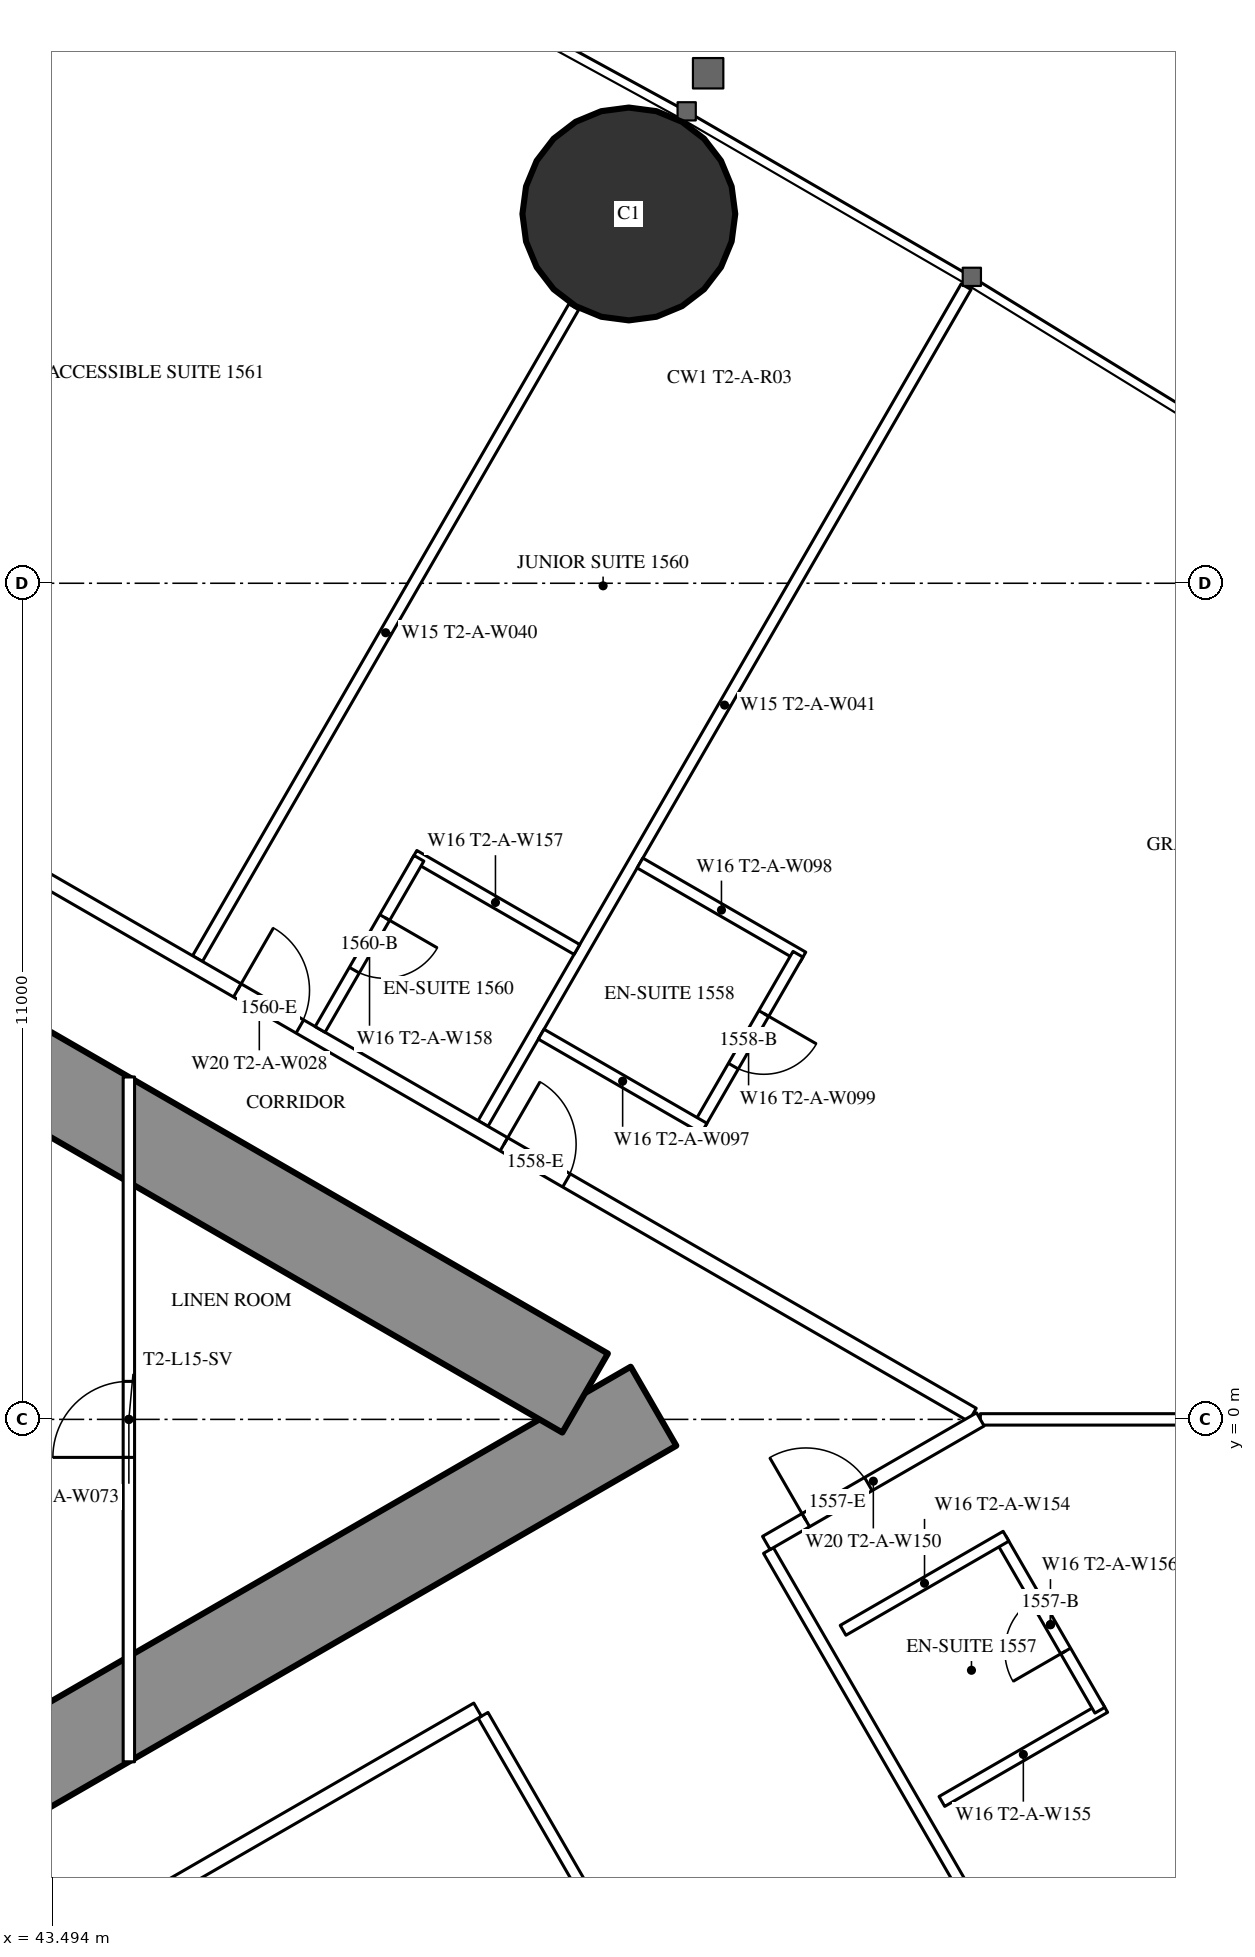
"""IFC4 building model, lengths in metres.
Left out: names, types, materials, properties, quantities, classifications, styles, units other than length and angle.
Written with IfcOpenShell. Run it as: python <this file> out.ifc"""

import sys

from ifc_helpers import new_model, si_unit, direction, frame, frame_2d, origin, origin_2d, place, context, subcontext, project, spatial, rectangle, hollow_circle, extrude, element, fill, save


model = new_model("IFC4")
c1 = context("Model", 3, precision=1e-05, world=origin(), true_north=direction((0.0, 1.0)))
c2 = subcontext(c1, "Body", "Model", "MODEL_VIEW")
j1 = project(units=[si_unit("LENGTHUNIT", "METRE"), si_unit("PLANEANGLEUNIT", "RADIAN")], contexts=[c1])
p1 = place(None, origin())
s1 = spatial("IfcSite", under=j1, at=p1, CompositionType="ELEMENT")
p2 = place(p1, origin())
s2 = spatial("IfcBuilding", under=s1, at=p2, CompositionType="ELEMENT")
p3 = place(p2, frame((0.0, 0.0, 60.0)))
s3 = spatial("IfcBuildingStorey", under=s2, at=p3, CompositionType="ELEMENT", Elevation=60.0)
p4 = place(p3, frame((51.078, 15.858, 0.0), z_axis=(0.0, 0.0, 1.0), x_axis=(1.0, 0.0, 0.0)))
e1 = element("IfcColumn", 1, at=p4, inside=s3, PredefinedType="COLUMN", context=c2, shape_type="SweptSolid", body=[
    extrude(hollow_circle(Radius=1.4, WallThickness=0.12, at=origin_2d()), origin(), (0.0, 0.0, 1.0), 3.5),
])
p5 = place(p3, frame((27.2, -13.8, 0.0), z_axis=(0.0, 0.0, 1.0), x_axis=(0.866027159892, 0.499996958321, 0.0)))
e2 = element("IfcWall", 2, at=p5, inside=s3, PredefinedType="SHEAR", context=c2, shape_type="SweptSolid", body=[
    extrude(rectangle(XDim=27.947, YDim=1.2, at=frame_2d((13.973, 0.0))), origin(), (0.0, 0.0, 1.0), 3.5),
])
p6 = place(p5, frame((4.6, 0.0, 0.0)))
e3 = element("IfcOpeningElement", 3, at=p6, cuts=e2, PredefinedType="OPENING", context=c2, shape_type="SweptSolid", body=[
    extrude(rectangle(XDim=1.0, YDim=2.2, at=frame_2d((0.5, 1.1))), frame((0.0, 0.61, 0.0), z_axis=(0.0, -1.0, 0.0), x_axis=(1.0, 0.0, 0.0)), (0.0, 0.0, 1.0), 1.22),
])
p7 = place(p5, frame((13.395, 0.0, 0.0)))
e4 = element("IfcOpeningElement", 4, at=p7, cuts=e2, PredefinedType="OPENING", context=c2, shape_type="SweptSolid", body=[
    extrude(rectangle(XDim=1.8, YDim=2.2, at=frame_2d((0.9, 1.1))), frame((0.0, 0.61, 0.0), z_axis=(0.0, -1.0, 0.0), x_axis=(1.0, 0.0, 0.0)), (0.0, 0.0, 1.0), 1.22),
])
p8 = place(p3, frame((27.2, 13.8, 0.0), z_axis=(0.0, 0.0, 1.0), x_axis=(0.866024515034, -0.500001539357, 0.0)))
e5 = element("IfcWall", 5, at=p8, inside=s3, PredefinedType="SHEAR", context=c2, shape_type="SweptSolid", body=[
    extrude(rectangle(XDim=26.907, YDim=1.2, at=frame_2d((13.454, 0.0))), origin(), (0.0, 0.0, 1.0), 3.5),
])
p9 = place(p8, frame((4.6, 0.0, 0.0)))
e6 = element("IfcOpeningElement", 6, at=p9, cuts=e5, PredefinedType="OPENING", context=c2, shape_type="SweptSolid", body=[
    extrude(rectangle(XDim=1.0, YDim=2.2, at=frame_2d((0.5, 1.1))), frame((0.0, 0.61, 0.0), z_axis=(0.0, -1.0, 0.0), x_axis=(1.0, 0.0, 0.0)), (0.0, 0.0, 1.0), 1.22),
])
p10 = place(p8, frame((13.395, 0.0, 0.0)))
e7 = element("IfcOpeningElement", 7, at=p10, cuts=e5, PredefinedType="OPENING", context=c2, shape_type="SweptSolid", body=[
    extrude(rectangle(XDim=1.8, YDim=2.2, at=frame_2d((0.9, 1.1))), frame((0.0, 0.61, 0.0), z_axis=(0.0, -1.0, 0.0), x_axis=(1.0, 0.0, 0.0)), (0.0, 0.0, 1.0), 1.22),
])
p11 = place(p3, frame((49.159, -3.893, 0.0), z_axis=(0.0, 0.0, 1.0), x_axis=(0.499998773722, -0.866026111775, 0.0)))
e8 = element("IfcWall", 8, at=p11, inside=s3, PredefinedType="PARTITIONING", context=c2, shape_type="SweptSolid", body=[
    extrude(rectangle(XDim=9.892, YDim=0.15, at=frame_2d((4.946, 0.0))), origin(), (0.0, 0.0, 1.0), 2.25),
])
p12 = place(p3, frame((52.915, -1.725, 0.0), z_axis=(0.0, 0.0, 1.0), x_axis=(0.499997163113, -0.866027041656, 0.0)))
e9 = element("IfcWall", 9, at=p12, inside=s3, PredefinedType="PARTITIONING", context=c2, shape_type="SweptSolid", body=[
    extrude(rectangle(XDim=12.591, YDim=0.15, at=frame_2d((6.295, 0.0))), origin(), (0.0, 0.0, 1.0), 3.25),
])
p13 = place(p3, frame((45.403, 6.062, 0.0), z_axis=(0.0, 0.0, 1.0), x_axis=(0.500013434677, 0.866017647131, 0.0)))
e10 = element("IfcWall", 10, at=p13, inside=s3, PredefinedType="PARTITIONING", context=c2, shape_type="SweptSolid", body=[
    extrude(rectangle(XDim=9.902, YDim=0.15, at=frame_2d((4.951, 0.0))), origin(), (0.0, 0.0, 1.0), 2.25),
])
p14 = place(p3, frame((49.159, 3.893, 0.0), z_axis=(0.0, 0.0, 1.0), x_axis=(0.499995664361, 0.866027906952, 0.0)))
e11 = element("IfcWall", 11, at=p14, inside=s3, PredefinedType="PARTITIONING", context=c2, shape_type="SweptSolid", body=[
    extrude(rectangle(XDim=12.711, YDim=0.15, at=frame_2d((6.356, 0.0))), origin(), (0.0, 0.0, 1.0), 3.25),
])
p15 = place(p3, frame((55.702, 0.0, 0.0), z_axis=(0.0, 0.0, 1.0), x_axis=(1.0, 0.0, 0.0)))
e12 = element("IfcWall", 12, at=p15, inside=s3, PredefinedType="PARTITIONING", context=c2, shape_type="SweptSolid", body=[
    extrude(rectangle(XDim=16.117, YDim=0.15, at=frame_2d((8.059, 0.0))), origin(), (0.0, 0.0, 1.0), 2.25),
])
p16 = place(p3, frame((36.834, 10.894, 0.0), z_axis=(0.0, 0.0, 1.0), x_axis=(0.866028157229, -0.499995230863, 0.0)))
e13 = element("IfcWall", 13, at=p16, inside=s3, PredefinedType="PARTITIONING", context=c2, shape_type="SweptSolid", body=[
    extrude(rectangle(XDim=21.667, YDim=0.2, at=frame_2d((10.833, 0.0))), origin(), (0.0, 0.0, 1.0), 3.25),
])
p17 = place(p16, frame((14.55, 0.0, 0.0)))
e14 = element("IfcOpeningElement", 14, at=p17, cuts=e13, PredefinedType="OPENING", context=c2, shape_type="SweptSolid", body=[
    extrude(rectangle(XDim=0.95, YDim=2.2, at=frame_2d((0.475, 1.1))), frame((0.0, 0.11, 0.0), z_axis=(0.0, -1.0, 0.0), x_axis=(1.0, 0.0, 0.0)), (0.0, 0.0, 1.0), 0.22),
])
p18 = place(p16, frame((10.5, 0.0, 0.0)))
e15 = element("IfcOpeningElement", 15, at=p18, cuts=e13, PredefinedType="OPENING", context=c2, shape_type="SweptSolid", body=[
    extrude(rectangle(XDim=0.95, YDim=2.2, at=frame_2d((0.475, 1.1))), frame((0.0, 0.11, 0.0), z_axis=(0.0, -1.0, 0.0), x_axis=(1.0, 0.0, 0.0)), (0.0, 0.0, 1.0), 0.22),
])
p19 = place(p16, frame((4.292, 0.0, 0.0)))
e16 = element("IfcOpeningElement", 16, at=p19, cuts=e13, PredefinedType="OPENING", context=c2, shape_type="SweptSolid", body=[
    extrude(rectangle(XDim=1.0, YDim=2.2, at=frame_2d((0.5, 1.1))), frame((0.0, 0.11, 0.0), z_axis=(0.0, -1.0, 0.0), x_axis=(1.0, 0.0, 0.0)), (0.0, 0.0, 1.0), 0.22),
])
p20 = place(p16, frame((0.246, 0.0, 0.0)))
e17 = element("IfcOpeningElement", 17, at=p20, cuts=e13, PredefinedType="OPENING", context=c2, shape_type="SweptSolid", body=[
    extrude(rectangle(XDim=0.9, YDim=2.2, at=frame_2d((0.45, 1.1))), frame((0.0, 0.11, 0.0), z_axis=(0.0, -1.0, 0.0), x_axis=(1.0, 0.0, 0.0)), (0.0, 0.0, 1.0), 0.22),
])
p21 = place(p3, frame((37.96, -10.243, 0.0), z_axis=(0.0, 0.0, 1.0), x_axis=(0.866030548046, 0.499991089772, 0.0)))
e18 = element("IfcWall", 18, at=p21, inside=s3, PredefinedType="PARTITIONING", context=c2, shape_type="SweptSolid", body=[
    extrude(rectangle(XDim=12.849, YDim=0.2, at=frame_2d((6.425, 0.0))), origin(), (0.0, 0.0, 1.0), 3.25),
])
p22 = place(p21, frame((4.575, 0.0, 0.0)))
e19 = element("IfcOpeningElement", 19, at=p22, cuts=e18, PredefinedType="OPENING", context=c2, shape_type="SweptSolid", body=[
    extrude(rectangle(XDim=0.95, YDim=2.2, at=frame_2d((0.475, 1.1))), frame((0.0, 0.11, 0.0), z_axis=(0.0, -1.0, 0.0), x_axis=(1.0, 0.0, 0.0)), (0.0, 0.0, 1.0), 0.22),
])
p23 = place(p21, frame((0.6, 0.0, 0.0)))
e20 = element("IfcOpeningElement", 20, at=p23, cuts=e18, PredefinedType="OPENING", context=c2, shape_type="SweptSolid", body=[
    extrude(rectangle(XDim=0.95, YDim=2.2, at=frame_2d((0.475, 1.1))), frame((0.0, 0.11, 0.0), z_axis=(0.0, -1.0, 0.0), x_axis=(1.0, 0.0, 0.0)), (0.0, 0.0, 1.0), 0.22),
])
p24 = place(p3, frame((52.886, -1.626, 0.0), z_axis=(0.0, 0.0, 1.0), x_axis=(0.866030540913, 0.499991102127, 0.0)))
e21 = element("IfcWall", 21, at=p24, inside=s3, PredefinedType="PARTITIONING", context=c2, shape_type="SweptSolid", body=[
    extrude(rectangle(XDim=3.251, YDim=0.2, at=frame_2d((1.626, 0.0))), origin(), (0.0, 0.0, 1.0), 3.25),
])
p25 = place(p24, frame((0.6, 0.0, 0.0)))
e22 = element("IfcOpeningElement", 22, at=p25, cuts=e21, PredefinedType="OPENING", context=c2, shape_type="SweptSolid", body=[
    extrude(rectangle(XDim=0.95, YDim=2.2, at=frame_2d((0.475, 1.1))), frame((0.0, 0.11, 0.0), z_axis=(0.0, -1.0, 0.0), x_axis=(1.0, 0.0, 0.0)), (0.0, 0.0, 1.0), 0.22),
])
p26 = place(p3, frame((55.196, -5.026, 0.0), z_axis=(0.0, 0.0, 1.0), x_axis=(0.866073894602, 0.499916002032, 0.0)))
e23 = element("IfcWall", 23, at=p26, inside=s3, PredefinedType="PARTITIONING", context=c2, shape_type="SweptSolid", body=[
    extrude(rectangle(XDim=2.475, YDim=0.15, at=frame_2d((1.238, 0.0))), origin(), (0.0, 0.0, 1.0), 3.25),
])
p27 = place(p3, frame((55.975, -1.575, 0.0), z_axis=(0.0, 0.0, 1.0), x_axis=(0.500006934395, -0.866021400173, 0.0)))
e24 = element("IfcWall", 24, at=p27, inside=s3, PredefinedType="PARTITIONING", context=c2, shape_type="SweptSolid", body=[
    extrude(rectangle(XDim=2.6, YDim=0.15, at=frame_2d((1.3, 0.0))), origin(), (0.0, 0.0, 1.0), 3.25),
])
p28 = place(p27, frame((0.9, 0.0, 0.0)))
e25 = element("IfcOpeningElement", 25, at=p28, cuts=e24, PredefinedType="OPENING", context=c2, shape_type="SweptSolid", body=[
    extrude(rectangle(XDim=0.8, YDim=2.2, at=frame_2d((0.4, 1.1))), frame((0.0, 0.085, 0.0), z_axis=(0.0, -1.0, 0.0), x_axis=(1.0, 0.0, 0.0)), (0.0, 0.0, 1.0), 0.17),
])
p29 = place(p3, frame((53.896, -2.775, 0.0), z_axis=(0.0, 0.0, 1.0), x_axis=(0.866006523861, 0.500032699561, 0.0)))
e26 = element("IfcWall", 26, at=p29, inside=s3, PredefinedType="PARTITIONING", context=c2, shape_type="SweptSolid", body=[
    extrude(rectangle(XDim=2.475, YDim=0.15, at=frame_2d((1.237, 0.0))), origin(), (0.0, 0.0, 1.0), 3.25),
])
p30 = place(p3, frame((51.224, 7.32, 0.0), z_axis=(0.0, 0.0, 1.0), x_axis=(0.866031185235, -0.4999899861, 0.0)))
e27 = element("IfcWall", 27, at=p30, inside=s3, PredefinedType="PARTITIONING", context=c2, shape_type="SweptSolid", body=[
    extrude(rectangle(XDim=2.475, YDim=0.15, at=frame_2d((1.238, 0.0))), origin(), (0.0, 0.0, 1.0), 3.25),
])
p31 = place(p3, frame((52.003, 3.868, 0.0), z_axis=(0.0, 0.0, 1.0), x_axis=(0.500047596559, 0.865997922154, 0.0)))
e28 = element("IfcWall", 28, at=p31, inside=s3, PredefinedType="PARTITIONING", context=c2, shape_type="SweptSolid", body=[
    extrude(rectangle(XDim=2.6, YDim=0.15, at=frame_2d((1.3, 0.0))), origin(), (0.0, 0.0, 1.0), 3.25),
])
p32 = place(p31, frame((0.9, 0.0, 0.0)))
e29 = element("IfcOpeningElement", 29, at=p32, cuts=e28, PredefinedType="OPENING", context=c2, shape_type="SweptSolid", body=[
    extrude(rectangle(XDim=0.8, YDim=2.2, at=frame_2d((0.4, 1.1))), frame((0.0, 0.085, 0.0), z_axis=(0.0, -1.0, 0.0), x_axis=(1.0, 0.0, 0.0)), (0.0, 0.0, 1.0), 0.17),
])
for number, where, z_axis, x_axis in (
    (30, (49.925, 5.068, 0.0), (0.0, 0.0, 1.0), (0.866, -0.5, 0.0)),
    (31, (48.251, 7.42, 0.0), (0.0, 0.0, 1.0), (0.866, -0.5, 0.0)),
):
    element("IfcWall", number, at=place(p3, frame(where, z_axis=z_axis, x_axis=x_axis)), inside=s3, PredefinedType="PARTITIONING", context=c2, shape_type="SweptSolid", body=[
        extrude(rectangle(XDim=2.475, YDim=0.15, at=frame_2d((1.237, 0.0))), origin(), (0.0, 0.0, 1.0), 3.25),
    ])
p33 = place(p3, frame((47.016, 5.13, 0.0), z_axis=(0.0, 0.0, 1.0), x_axis=(0.500006934395, 0.866021400173, 0.0)))
e32 = element("IfcWall", 32, at=p33, inside=s3, PredefinedType="PARTITIONING", context=c2, shape_type="SweptSolid", body=[
    extrude(rectangle(XDim=2.6, YDim=0.15, at=frame_2d((1.3, 0.0))), origin(), (0.0, 0.0, 1.0), 3.25),
])
p34 = place(p33, frame((0.9, 0.0, 0.0)))
e33 = element("IfcOpeningElement", 33, at=p34, cuts=e32, PredefinedType="OPENING", context=c2, shape_type="SweptSolid", body=[
    extrude(rectangle(XDim=0.8, YDim=2.2, at=frame_2d((0.4, 1.1))), frame((0.0, 0.085, 0.0), z_axis=(0.0, -1.0, 0.0), x_axis=(1.0, 0.0, 0.0)), (0.0, 0.0, 1.0), 0.17),
])
p35 = place(p3, frame((44.5, -4.505, 0.0), z_axis=(0.0, 0.0, 1.0), x_axis=(0.0, 1.0, 0.0)))
e34 = element("IfcWall", 34, at=p35, inside=s3, PredefinedType="PARTITIONING", context=c2, shape_type="SweptSolid", body=[
    extrude(rectangle(XDim=9.009, YDim=0.15, at=frame_2d((4.505, 0.0))), origin(), (0.0, 0.0, 1.0), 2.45),
])
p36 = place(p35, frame((4.005, 0.0, 0.0)))
e35 = element("IfcOpeningElement", 35, at=p36, cuts=e34, PredefinedType="OPENING", context=c2, shape_type="SweptSolid", body=[
    extrude(rectangle(XDim=1.0, YDim=2.2, at=frame_2d((0.5, 1.1))), frame((0.0, 0.085, 0.0), z_axis=(0.0, -1.0, 0.0), x_axis=(1.0, 0.0, 0.0)), (0.0, 0.0, 1.0), 0.17),
])
p37 = place(p28, origin())
e36 = element("IfcDoor", 36, at=p37, inside=s3, OperationType="SINGLE_SWING_RIGHT", PredefinedType="DOOR", context=c2, shape_type="SweptSolid", body=[
    extrude(rectangle(XDim=0.8, YDim=2.2, at=frame_2d((0.4, 1.1))), frame((0.0, 0.025, 0.0), z_axis=(0.0, -1.0, 0.0), x_axis=(1.0, 0.0, 0.0)), (0.0, 0.0, 1.0), 0.05),
])
fill(e25, e36)
p38 = place(p25, origin())
e37 = element("IfcDoor", 37, at=p38, inside=s3, OperationType="SINGLE_SWING_LEFT", PredefinedType="DOOR", context=c2, shape_type="SweptSolid", body=[
    extrude(rectangle(XDim=0.95, YDim=2.2, at=frame_2d((0.475, 1.1))), frame((0.0, 0.025, 0.0), z_axis=(0.0, -1.0, 0.0), x_axis=(1.0, 0.0, 0.0)), (0.0, 0.0, 1.0), 0.05),
])
fill(e22, e37)
p39 = place(p32, origin())
e38 = element("IfcDoor", 38, at=p39, inside=s3, OperationType="SINGLE_SWING_RIGHT", PredefinedType="DOOR", context=c2, shape_type="SweptSolid", body=[
    extrude(rectangle(XDim=0.8, YDim=2.2, at=frame_2d((0.4, 1.1))), frame((0.0, 0.025, 0.0), z_axis=(0.0, -1.0, 0.0), x_axis=(1.0, 0.0, 0.0)), (0.0, 0.0, 1.0), 0.05),
])
fill(e29, e38)
p40 = place(p17, origin())
e39 = element("IfcDoor", 39, at=p40, inside=s3, OperationType="SINGLE_SWING_LEFT", PredefinedType="DOOR", context=c2, shape_type="SweptSolid", body=[
    extrude(rectangle(XDim=0.95, YDim=2.2, at=frame_2d((0.475, 1.1))), frame((0.0, 0.025, 0.0), z_axis=(0.0, -1.0, 0.0), x_axis=(1.0, 0.0, 0.0)), (0.0, 0.0, 1.0), 0.05),
])
fill(e14, e39)
p41 = place(p34, origin())
e40 = element("IfcDoor", 40, at=p41, inside=s3, OperationType="SINGLE_SWING_RIGHT", PredefinedType="DOOR", context=c2, shape_type="SweptSolid", body=[
    extrude(rectangle(XDim=0.8, YDim=2.2, at=frame_2d((0.4, 1.1))), frame((0.0, 0.025, 0.0), z_axis=(0.0, -1.0, 0.0), x_axis=(1.0, 0.0, 0.0)), (0.0, 0.0, 1.0), 0.05),
])
fill(e33, e40)
p42 = place(p18, origin())
e41 = element("IfcDoor", 41, at=p42, inside=s3, OperationType="SINGLE_SWING_LEFT", PredefinedType="DOOR", context=c2, shape_type="SweptSolid", body=[
    extrude(rectangle(XDim=0.95, YDim=2.2, at=frame_2d((0.475, 1.1))), frame((0.0, 0.025, 0.0), z_axis=(0.0, -1.0, 0.0), x_axis=(1.0, 0.0, 0.0)), (0.0, 0.0, 1.0), 0.05),
])
fill(e15, e41)
p43 = place(p36, origin())
e42 = element("IfcDoor", 42, at=p43, inside=s3, OperationType="SINGLE_SWING_LEFT", PredefinedType="DOOR", context=c2, shape_type="SweptSolid", body=[
    extrude(rectangle(XDim=1.0, YDim=2.2, at=frame_2d((0.5, 1.1))), frame((0.0, 0.025, 0.0), z_axis=(0.0, -1.0, 0.0), x_axis=(1.0, 0.0, 0.0)), (0.0, 0.0, 1.0), 0.05),
])
fill(e35, e42)
save(model, sys.argv[1])
